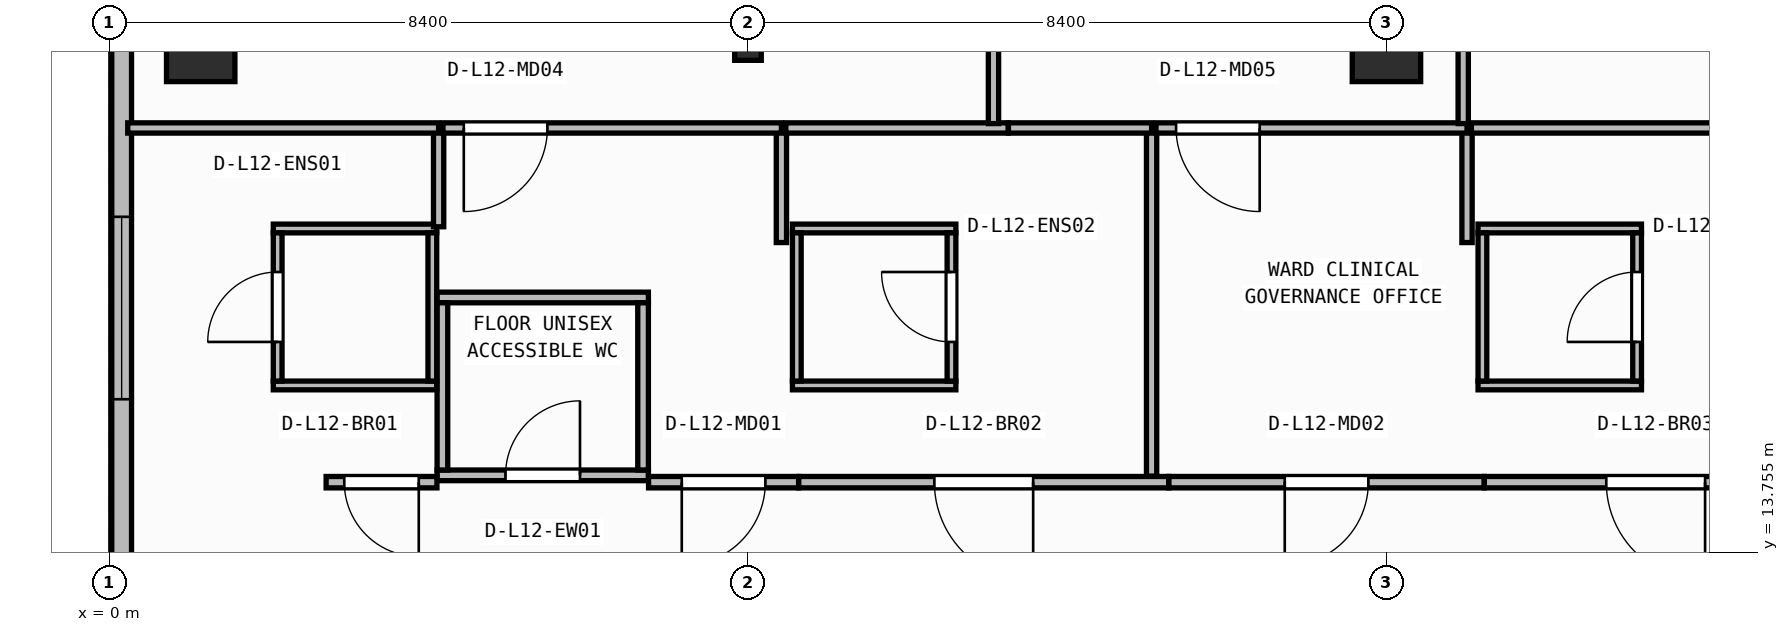
"""IFC4 building model, lengths in metres.
Left out: names, types, materials, properties, quantities, classifications, styles, units other than length and angle.
Written with IfcOpenShell. Run it as: python <this file> out.ifc"""

import sys

from ifc_helpers import new_model, si_unit, direction, frame, frame_2d, origin, origin_2d, place, context, subcontext, project, spatial, rectangle, i_section, extrude, element, fill, save


model = new_model("IFC4")
c1 = context("Model", 3, precision=1e-05, world=origin(), true_north=direction((0.0, 1.0)))
c2 = subcontext(c1, "Body", "Model", "MODEL_VIEW")
j1 = project(units=[si_unit("LENGTHUNIT", "METRE"), si_unit("PLANEANGLEUNIT", "RADIAN")], contexts=[c1])
p1 = place(None, origin())
s1 = spatial("IfcSite", under=j1, at=p1, CompositionType="ELEMENT")
p2 = place(p1, origin())
s2 = spatial("IfcBuilding", under=s1, at=p2, CompositionType="ELEMENT")
p3 = place(p2, frame((0.0, 0.0, 50.15)))
s3 = spatial("IfcBuildingStorey", under=s2, at=p3, CompositionType="ELEMENT", Elevation=50.15)
p4 = place(p3, frame((1.2, 20.4, 0.0), z_axis=(0.0, 0.0, 1.0), x_axis=(1.0, 0.0, 0.0)))
e1 = element("IfcColumn", 1, at=p4, inside=s3, PredefinedType="COLUMN", context=c2, shape_type="SweptSolid", body=[
    extrude(rectangle(XDim=0.9, YDim=0.9, at=origin_2d()), origin(), (0.0, 0.0, 1.0), 3.95),
])
p5 = place(p3, frame((8.4, 20.4, 0.0), z_axis=(0.0, 0.0, 1.0), x_axis=(1.0, 0.0, 0.0)))
e2 = element("IfcColumn", 2, at=p5, inside=s3, PredefinedType="COLUMN", context=c2, shape_type="SweptSolid", body=[
    extrude(i_section(OverallWidth=0.35, OverallDepth=0.34, WebThickness=0.016, FlangeThickness=0.028, at=origin_2d()), origin(), (0.0, 0.0, 1.0), 3.95),
])
p6 = place(p3, frame((16.8, 20.4, 0.0), z_axis=(0.0, 0.0, 1.0), x_axis=(1.0, 0.0, 0.0)))
e3 = element("IfcColumn", 3, at=p6, inside=s3, PredefinedType="COLUMN", context=c2, shape_type="SweptSolid", body=[
    extrude(rectangle(XDim=0.9, YDim=0.9, at=origin_2d()), origin(), (0.0, 0.0, 1.0), 3.95),
])
p7 = place(p3, frame((0.16, 41.04, 0.0), z_axis=(0.0, 0.0, 1.0), x_axis=(0.0, -1.0, 0.0)))
e4 = element("IfcWall", 4, at=p7, inside=s3, PredefinedType="STANDARD", context=c2, shape_type="SweptSolid", body=[
    extrude(rectangle(XDim=38.28, YDim=0.26, at=frame_2d((19.14, 0.0))), origin(), (0.0, 0.0, 1.0), 3.71),
])
p8 = place(p7, frame((17.94, 0.0, 0.9)))
e5 = element("IfcOpeningElement", 5, at=p8, cuts=e4, PredefinedType="OPENING", context=c2, shape_type="SweptSolid", body=[
    extrude(rectangle(XDim=2.4, YDim=1.65, at=frame_2d((1.2, 0.825))), frame((0.0, 0.14, 0.0), z_axis=(0.0, -1.0, 0.0), x_axis=(1.0, 0.0, 0.0)), (0.0, 0.0, 1.0), 0.28),
])
p9 = place(p7, frame((22.869, 0.0, 0.9)))
e6 = element("IfcOpeningElement", 6, at=p9, cuts=e4, PredefinedType="OPENING", context=c2, shape_type="SweptSolid", body=[
    extrude(rectangle(XDim=2.4, YDim=1.65, at=frame_2d((1.2, 0.825))), frame((0.0, 0.14, 0.0), z_axis=(0.0, -1.0, 0.0), x_axis=(1.0, 0.0, 0.0)), (0.0, 0.0, 1.0), 0.28),
])
p10 = place(p3, frame((4.31, 14.77, 0.0), z_axis=(0.0, 0.0, 1.0), x_axis=(1.0, 0.0, 0.0)))
e7 = element("IfcWall", 7, at=p10, inside=s3, PredefinedType="PARTITIONING", context=c2, shape_type="SweptSolid", body=[
    extrude(rectangle(XDim=2.78, YDim=0.14, at=frame_2d((1.39, 0.0))), origin(), (0.0, 0.0, 1.0), 3.71),
])
p11 = place(p10, frame((0.9, 0.0, 0.0)))
e8 = element("IfcOpeningElement", 8, at=p11, cuts=e7, PredefinedType="OPENING", context=c2, shape_type="SweptSolid", body=[
    extrude(rectangle(XDim=0.98, YDim=2.1, at=frame_2d((0.49, 1.05))), frame((0.0, 0.08, 0.0), z_axis=(0.0, -1.0, 0.0), x_axis=(1.0, 0.0, 0.0)), (0.0, 0.0, 1.0), 0.16),
])
p12 = place(p3, frame((4.31, 17.11, 0.0), z_axis=(0.0, 0.0, 1.0), x_axis=(1.0, 0.0, 0.0)))
e9 = element("IfcWall", 9, at=p12, inside=s3, PredefinedType="PARTITIONING", context=c2, shape_type="SweptSolid", body=[
    extrude(rectangle(XDim=2.78, YDim=0.14, at=frame_2d((1.39, 0.0))), origin(), (0.0, 0.0, 1.0), 3.71),
])
for number, where, z_axis, x_axis in (
    (10, (4.38, 14.84, 0.0), (0.0, 0.0, 1.0), (0.0, 1.0, 0.0)),
    (11, (7.02, 14.84, 0.0), (0.0, 0.0, 1.0), (0.0, 1.0, 0.0)),
):
    element("IfcWall", number, at=place(p3, frame(where, z_axis=z_axis, x_axis=x_axis)), inside=s3, PredefinedType="PARTITIONING", context=c2, shape_type="SweptSolid", body=[
        extrude(rectangle(XDim=2.2, YDim=0.14, at=frame_2d((1.1, 0.0))), origin(), (0.0, 0.0, 1.0), 3.71),
    ])
for number, where, z_axis, x_axis in (
    (12, (2.155, 15.952, 0.0), (0.0, 0.0, 1.0), (1.0, 0.0, 0.0)),
    (13, (2.155, 18.018, 0.0), (0.0, 0.0, 1.0), (1.0, 0.0, 0.0)),
):
    element("IfcWall", number, at=place(p3, frame(where, z_axis=z_axis, x_axis=x_axis)), inside=s3, PredefinedType="PARTITIONING", context=c2, shape_type="SweptSolid", body=[
        extrude(rectangle(XDim=2.15, YDim=0.115, at=frame_2d((1.075, 0.0))), origin(), (0.0, 0.0, 1.0), 3.71),
    ])
p13 = place(p3, frame((2.212, 16.01, 0.0), z_axis=(0.0, 0.0, 1.0), x_axis=(0.0, 1.0, 0.0)))
e14 = element("IfcWall", 14, at=p13, inside=s3, PredefinedType="PARTITIONING", context=c2, shape_type="SweptSolid", body=[
    extrude(rectangle(XDim=1.95, YDim=0.115, at=frame_2d((0.975, 0.0))), origin(), (0.0, 0.0, 1.0), 3.71),
])
p14 = place(p13, frame((0.515, 0.0, 0.0)))
e15 = element("IfcOpeningElement", 15, at=p14, cuts=e14, PredefinedType="OPENING", context=c2, shape_type="SweptSolid", body=[
    extrude(rectangle(XDim=0.92, YDim=2.1, at=frame_2d((0.46, 1.05))), frame((0.0, 0.067, 0.0), z_axis=(0.0, -1.0, 0.0), x_axis=(1.0, 0.0, 0.0)), (0.0, 0.0, 1.0), 0.135),
])
p15 = place(p3, frame((4.248, 16.01, 0.0), z_axis=(0.0, 0.0, 1.0), x_axis=(0.0, 1.0, 0.0)))
e16 = element("IfcWall", 16, at=p15, inside=s3, PredefinedType="PARTITIONING", context=c2, shape_type="SweptSolid", body=[
    extrude(rectangle(XDim=1.95, YDim=0.115, at=frame_2d((0.975, 0.0))), origin(), (0.0, 0.0, 1.0), 3.71),
])
for number, where, z_axis, x_axis in (
    (17, (8.985, 15.952, 0.0), (0.0, 0.0, 1.0), (1.0, 0.0, 0.0)),
    (18, (8.985, 18.018, 0.0), (0.0, 0.0, 1.0), (1.0, 0.0, 0.0)),
):
    element("IfcWall", number, at=place(p3, frame(where, z_axis=z_axis, x_axis=x_axis)), inside=s3, PredefinedType="PARTITIONING", context=c2, shape_type="SweptSolid", body=[
        extrude(rectangle(XDim=2.15, YDim=0.115, at=frame_2d((1.075, 0.0))), origin(), (0.0, 0.0, 1.0), 3.71),
    ])
p16 = place(p3, frame((9.042, 16.01, 0.0), z_axis=(0.0, 0.0, 1.0), x_axis=(0.0, 1.0, 0.0)))
e19 = element("IfcWall", 19, at=p16, inside=s3, PredefinedType="PARTITIONING", context=c2, shape_type="SweptSolid", body=[
    extrude(rectangle(XDim=1.95, YDim=0.115, at=frame_2d((0.975, 0.0))), origin(), (0.0, 0.0, 1.0), 3.71),
])
p17 = place(p3, frame((11.077, 16.01, 0.0), z_axis=(0.0, 0.0, 1.0), x_axis=(0.0, 1.0, 0.0)))
e20 = element("IfcWall", 20, at=p17, inside=s3, PredefinedType="PARTITIONING", context=c2, shape_type="SweptSolid", body=[
    extrude(rectangle(XDim=1.95, YDim=0.115, at=frame_2d((0.975, 0.0))), origin(), (0.0, 0.0, 1.0), 3.71),
])
p18 = place(p17, frame((0.515, 0.0, 0.0)))
e21 = element("IfcOpeningElement", 21, at=p18, cuts=e20, PredefinedType="OPENING", context=c2, shape_type="SweptSolid", body=[
    extrude(rectangle(XDim=0.92, YDim=2.1, at=frame_2d((0.46, 1.05))), frame((0.0, 0.067, 0.0), z_axis=(0.0, -1.0, 0.0), x_axis=(1.0, 0.0, 0.0)), (0.0, 0.0, 1.0), 0.135),
])
for number, where, z_axis, x_axis in (
    (22, (18.005, 15.952, 0.0), (0.0, 0.0, 1.0), (1.0, 0.0, 0.0)),
    (23, (18.005, 18.018, 0.0), (0.0, 0.0, 1.0), (1.0, 0.0, 0.0)),
):
    element("IfcWall", number, at=place(p3, frame(where, z_axis=z_axis, x_axis=x_axis)), inside=s3, PredefinedType="PARTITIONING", context=c2, shape_type="SweptSolid", body=[
        extrude(rectangle(XDim=2.15, YDim=0.115, at=frame_2d((1.075, 0.0))), origin(), (0.0, 0.0, 1.0), 3.71),
    ])
p19 = place(p3, frame((18.062, 16.01, 0.0), z_axis=(0.0, 0.0, 1.0), x_axis=(0.0, 1.0, 0.0)))
e24 = element("IfcWall", 24, at=p19, inside=s3, PredefinedType="PARTITIONING", context=c2, shape_type="SweptSolid", body=[
    extrude(rectangle(XDim=1.95, YDim=0.115, at=frame_2d((0.975, 0.0))), origin(), (0.0, 0.0, 1.0), 3.71),
])
p20 = place(p3, frame((20.097, 16.01, 0.0), z_axis=(0.0, 0.0, 1.0), x_axis=(0.0, 1.0, 0.0)))
e25 = element("IfcWall", 25, at=p20, inside=s3, PredefinedType="PARTITIONING", context=c2, shape_type="SweptSolid", body=[
    extrude(rectangle(XDim=1.95, YDim=0.115, at=frame_2d((0.975, 0.0))), origin(), (0.0, 0.0, 1.0), 3.71),
])
p21 = place(p20, frame((0.515, 0.0, 0.0)))
e26 = element("IfcOpeningElement", 26, at=p21, cuts=e25, PredefinedType="OPENING", context=c2, shape_type="SweptSolid", body=[
    extrude(rectangle(XDim=0.92, YDim=2.1, at=frame_2d((0.46, 1.05))), frame((0.0, 0.067, 0.0), z_axis=(0.0, -1.0, 0.0), x_axis=(1.0, 0.0, 0.0)), (0.0, 0.0, 1.0), 0.135),
])
p22 = place(p3, frame((4.308, 14.68, 0.0), z_axis=(0.0, 0.0, 1.0), x_axis=(-1.0, 0.0, 0.0)))
e27 = element("IfcWall", 27, at=p22, inside=s3, PredefinedType="PARTITIONING", context=c2, shape_type="SweptSolid", body=[
    extrude(rectangle(XDim=1.458, YDim=0.15, at=frame_2d((0.729, 0.0))), origin(), (0.0, 0.0, 1.0), 3.71),
])
p23 = place(p22, frame((0.239, 0.0, 0.0)))
e28 = element("IfcOpeningElement", 28, at=p23, cuts=e27, PredefinedType="OPENING", context=c2, shape_type="SweptSolid", body=[
    extrude(rectangle(XDim=0.98, YDim=2.1, at=frame_2d((0.49, 1.05))), frame((0.0, 0.085, 0.0), z_axis=(0.0, -1.0, 0.0), x_axis=(1.0, 0.0, 0.0)), (0.0, 0.0, 1.0), 0.17),
])
p24 = place(p3, frame((9.066, 14.68, 0.0), z_axis=(0.0, 0.0, 1.0), x_axis=(-1.0, 0.0, 0.0)))
e29 = element("IfcWall", 29, at=p24, inside=s3, PredefinedType="PARTITIONING", context=c2, shape_type="SweptSolid", body=[
    extrude(rectangle(XDim=1.974, YDim=0.15, at=frame_2d((0.987, 0.0))), origin(), (0.0, 0.0, 1.0), 3.71),
])
p25 = place(p24, frame((0.437, 0.0, 0.0)))
e30 = element("IfcOpeningElement", 30, at=p25, cuts=e29, PredefinedType="OPENING", context=c2, shape_type="SweptSolid", body=[
    extrude(rectangle(XDim=1.1, YDim=2.1, at=frame_2d((0.55, 1.05))), frame((0.0, 0.085, 0.0), z_axis=(0.0, -1.0, 0.0), x_axis=(1.0, 0.0, 0.0)), (0.0, 0.0, 1.0), 0.17),
])
p26 = place(p3, frame((13.936, 14.68, 0.0), z_axis=(0.0, 0.0, 1.0), x_axis=(-1.0, 0.0, 0.0)))
e31 = element("IfcWall", 31, at=p26, inside=s3, PredefinedType="PARTITIONING", context=c2, shape_type="SweptSolid", body=[
    extrude(rectangle(XDim=4.868, YDim=0.15, at=frame_2d((2.434, 0.0))), origin(), (0.0, 0.0, 1.0), 3.71),
])
p27 = place(p26, frame((1.784, 0.0, 0.0)))
e32 = element("IfcOpeningElement", 32, at=p27, cuts=e31, PredefinedType="OPENING", context=c2, shape_type="SweptSolid", body=[
    extrude(rectangle(XDim=1.3, YDim=2.15, at=frame_2d((0.65, 1.075))), frame((0.0, 0.085, 0.0), z_axis=(0.0, -1.0, 0.0), x_axis=(1.0, 0.0, 0.0)), (0.0, 0.0, 1.0), 0.17),
])
p28 = place(p3, frame((18.086, 14.68, 0.0), z_axis=(0.0, 0.0, 1.0), x_axis=(-1.0, 0.0, 0.0)))
e33 = element("IfcWall", 33, at=p28, inside=s3, PredefinedType="PARTITIONING", context=c2, shape_type="SweptSolid", body=[
    extrude(rectangle(XDim=4.148, YDim=0.15, at=frame_2d((2.074, 0.0))), origin(), (0.0, 0.0, 1.0), 3.71),
])
p29 = place(p28, frame((1.524, 0.0, 0.0)))
e34 = element("IfcOpeningElement", 34, at=p29, cuts=e33, PredefinedType="OPENING", context=c2, shape_type="SweptSolid", body=[
    extrude(rectangle(XDim=1.1, YDim=2.1, at=frame_2d((0.55, 1.05))), frame((0.0, 0.085, 0.0), z_axis=(0.0, -1.0, 0.0), x_axis=(1.0, 0.0, 0.0)), (0.0, 0.0, 1.0), 0.17),
])
p30 = place(p3, frame((22.596, 14.68, 0.0), z_axis=(0.0, 0.0, 1.0), x_axis=(-1.0, 0.0, 0.0)))
e35 = element("IfcWall", 35, at=p30, inside=s3, PredefinedType="PARTITIONING", context=c2, shape_type="SweptSolid", body=[
    extrude(rectangle(XDim=4.508, YDim=0.15, at=frame_2d((2.254, 0.0))), origin(), (0.0, 0.0, 1.0), 3.71),
])
p31 = place(p30, frame((1.604, 0.0, 0.0)))
e36 = element("IfcOpeningElement", 36, at=p31, cuts=e35, PredefinedType="OPENING", context=c2, shape_type="SweptSolid", body=[
    extrude(rectangle(XDim=1.3, YDim=2.15, at=frame_2d((0.65, 1.075))), frame((0.0, 0.085, 0.0), z_axis=(0.0, -1.0, 0.0), x_axis=(1.0, 0.0, 0.0)), (0.0, 0.0, 1.0), 0.17),
])
p32 = place(p3, frame((4.33, 18.04, 0.0), z_axis=(0.0, 0.0, 1.0), x_axis=(0.0, 1.0, 0.0)))
e37 = element("IfcWall", 37, at=p32, inside=s3, PredefinedType="PARTITIONING", context=c2, shape_type="SweptSolid", body=[
    extrude(rectangle(XDim=1.3, YDim=0.135, at=frame_2d((0.65, 0.0))), origin(), (0.0, 0.0, 1.0), 3.71),
])
p33 = place(p3, frame((4.33, 19.34, 0.0), z_axis=(0.0, 0.0, 1.0), x_axis=(-1.0, 0.0, 0.0)))
e38 = element("IfcWall", 38, at=p33, inside=s3, PredefinedType="PARTITIONING", context=c2, shape_type="SweptSolid", body=[
    extrude(rectangle(XDim=4.09, YDim=0.135, at=frame_2d((2.045, 0.0))), origin(), (0.0, 0.0, 1.0), 3.71),
])
p34 = place(p3, frame((8.84, 17.833, 0.0), z_axis=(0.0, 0.0, 1.0), x_axis=(0.0, 1.0, 0.0)))
e39 = element("IfcWall", 39, at=p34, inside=s3, PredefinedType="PARTITIONING", context=c2, shape_type="SweptSolid", body=[
    extrude(rectangle(XDim=1.508, YDim=0.135, at=frame_2d((0.754, 0.0))), origin(), (0.0, 0.0, 1.0), 3.71),
])
p35 = place(p3, frame((8.84, 19.34, 0.0), z_axis=(0.0, 0.0, 1.0), x_axis=(-1.0, 0.0, 0.0)))
e40 = element("IfcWall", 40, at=p35, inside=s3, PredefinedType="PARTITIONING", context=c2, shape_type="SweptSolid", body=[
    extrude(rectangle(XDim=4.453, YDim=0.135, at=frame_2d((2.226, 0.0))), origin(), (0.0, 0.0, 1.0), 3.71),
])
p36 = place(p35, frame((3.079, 0.0, 0.0)))
e41 = element("IfcOpeningElement", 41, at=p36, cuts=e40, PredefinedType="OPENING", context=c2, shape_type="SweptSolid", body=[
    extrude(rectangle(XDim=1.1, YDim=2.1, at=frame_2d((0.55, 1.05))), frame((0.0, 0.077, 0.0), z_axis=(0.0, -1.0, 0.0), x_axis=(1.0, 0.0, 0.0)), (0.0, 0.0, 1.0), 0.155),
])
p37 = place(p3, frame((13.71, 14.76, 0.0), z_axis=(0.0, 0.0, 1.0), x_axis=(0.0, 1.0, 0.0)))
e42 = element("IfcWall", 42, at=p37, inside=s3, PredefinedType="PARTITIONING", context=c2, shape_type="SweptSolid", body=[
    extrude(rectangle(XDim=4.58, YDim=0.135, at=frame_2d((2.29, 0.0))), origin(), (0.0, 0.0, 1.0), 3.71),
])
p38 = place(p3, frame((11.825, 19.34, 0.0), z_axis=(0.0, 0.0, 1.0), x_axis=(-1.0, 0.0, 0.0)))
e43 = element("IfcWall", 43, at=p38, inside=s3, PredefinedType="PARTITIONING", context=c2, shape_type="SweptSolid", body=[
    extrude(rectangle(XDim=2.927, YDim=0.135, at=frame_2d((1.464, 0.0))), origin(), (0.0, 0.0, 1.0), 3.71),
])
p39 = place(p3, frame((13.71, 19.34, 0.0), z_axis=(0.0, 0.0, 1.0), x_axis=(-1.0, 0.0, 0.0)))
e44 = element("IfcWall", 44, at=p39, inside=s3, PredefinedType="PARTITIONING", context=c2, shape_type="SweptSolid", body=[
    extrude(rectangle(XDim=1.883, YDim=0.135, at=frame_2d((0.942, 0.0))), origin(), (0.0, 0.0, 1.0), 3.71),
])
p40 = place(p3, frame((17.86, 17.833, 0.0), z_axis=(0.0, 0.0, 1.0), x_axis=(0.0, 1.0, 0.0)))
e45 = element("IfcWall", 45, at=p40, inside=s3, PredefinedType="PARTITIONING", context=c2, shape_type="SweptSolid", body=[
    extrude(rectangle(XDim=1.508, YDim=0.135, at=frame_2d((0.754, 0.0))), origin(), (0.0, 0.0, 1.0), 3.71),
])
p41 = place(p3, frame((17.86, 19.34, 0.0), z_axis=(0.0, 0.0, 1.0), x_axis=(-1.0, 0.0, 0.0)))
e46 = element("IfcWall", 46, at=p41, inside=s3, PredefinedType="PARTITIONING", context=c2, shape_type="SweptSolid", body=[
    extrude(rectangle(XDim=4.093, YDim=0.135, at=frame_2d((2.046, 0.0))), origin(), (0.0, 0.0, 1.0), 3.71),
])
p42 = place(p41, frame((2.728, 0.0, 0.0)))
e47 = element("IfcOpeningElement", 47, at=p42, cuts=e46, PredefinedType="OPENING", context=c2, shape_type="SweptSolid", body=[
    extrude(rectangle(XDim=1.1, YDim=2.1, at=frame_2d((0.55, 1.05))), frame((0.0, 0.077, 0.0), z_axis=(0.0, -1.0, 0.0), x_axis=(1.0, 0.0, 0.0)), (0.0, 0.0, 1.0), 0.155),
])
p43 = place(p3, frame((22.37, 19.34, 0.0), z_axis=(0.0, 0.0, 1.0), x_axis=(-1.0, 0.0, 0.0)))
e48 = element("IfcWall", 48, at=p43, inside=s3, PredefinedType="PARTITIONING", context=c2, shape_type="SweptSolid", body=[
    extrude(rectangle(XDim=4.453, YDim=0.135, at=frame_2d((2.226, 0.0))), origin(), (0.0, 0.0, 1.0), 3.71),
])
for number, where, z_axis, x_axis in (
    (49, (11.63, 19.397, 0.0), (0.0, 0.0, 1.0), (0.0, 1.0, 0.0)),
    (50, (17.81, 19.397, 0.0), (0.0, 0.0, 1.0), (0.0, 1.0, 0.0)),
):
    element("IfcWall", number, at=place(p3, frame(where, z_axis=z_axis, x_axis=x_axis)), inside=s3, PredefinedType="PARTITIONING", context=c2, shape_type="SweptSolid", body=[
        extrude(rectangle(XDim=9.522, YDim=0.135, at=frame_2d((4.761, 0.0))), origin(), (0.0, 0.0, 1.0), 3.71),
    ])
p44 = place(p11, origin())
e51 = element("IfcDoor", 51, at=p44, inside=s3, OperationType="SINGLE_SWING_RIGHT", PredefinedType="DOOR", context=c2, shape_type="SweptSolid", body=[
    extrude(rectangle(XDim=0.98, YDim=2.1, at=frame_2d((0.49, 1.05))), frame((0.0, 0.025, 0.0), z_axis=(0.0, -1.0, 0.0), x_axis=(1.0, 0.0, 0.0)), (0.0, 0.0, 1.0), 0.05),
])
fill(e8, e51)
p45 = place(p14, origin())
e52 = element("IfcDoor", 52, at=p45, inside=s3, OperationType="SINGLE_SWING_LEFT", PredefinedType="DOOR", context=c2, shape_type="SweptSolid", body=[
    extrude(rectangle(XDim=0.92, YDim=2.1, at=frame_2d((0.46, 1.05))), frame((0.0, 0.025, 0.0), z_axis=(0.0, -1.0, 0.0), x_axis=(1.0, 0.0, 0.0)), (0.0, 0.0, 1.0), 0.05),
])
fill(e15, e52)
p46 = place(p18, origin())
e53 = element("IfcDoor", 53, at=p46, inside=s3, OperationType="SINGLE_SWING_RIGHT", PredefinedType="DOOR", context=c2, shape_type="SweptSolid", body=[
    extrude(rectangle(XDim=0.92, YDim=2.1, at=frame_2d((0.46, 1.05))), frame((0.0, 0.025, 0.0), z_axis=(0.0, -1.0, 0.0), x_axis=(1.0, 0.0, 0.0)), (0.0, 0.0, 1.0), 0.05),
])
fill(e21, e53)
p47 = place(p21, origin())
e54 = element("IfcDoor", 54, at=p47, inside=s3, OperationType="SINGLE_SWING_LEFT", PredefinedType="DOOR", context=c2, shape_type="SweptSolid", body=[
    extrude(rectangle(XDim=0.92, YDim=2.1, at=frame_2d((0.46, 1.05))), frame((0.0, 0.025, 0.0), z_axis=(0.0, -1.0, 0.0), x_axis=(1.0, 0.0, 0.0)), (0.0, 0.0, 1.0), 0.05),
])
fill(e26, e54)
p48 = place(p23, origin())
e55 = element("IfcDoor", 55, at=p48, inside=s3, OperationType="SINGLE_SWING_LEFT", PredefinedType="DOOR", context=c2, shape_type="SweptSolid", body=[
    extrude(rectangle(XDim=0.98, YDim=2.1, at=frame_2d((0.49, 1.05))), frame((0.0, 0.025, 0.0), z_axis=(0.0, -1.0, 0.0), x_axis=(1.0, 0.0, 0.0)), (0.0, 0.0, 1.0), 0.05),
])
fill(e28, e55)
p49 = place(p25, origin())
e56 = element("IfcDoor", 56, at=p49, inside=s3, OperationType="SINGLE_SWING_RIGHT", PredefinedType="DOOR", context=c2, shape_type="SweptSolid", body=[
    extrude(rectangle(XDim=1.1, YDim=2.1, at=frame_2d((0.55, 1.05))), frame((0.0, 0.025, 0.0), z_axis=(0.0, -1.0, 0.0), x_axis=(1.0, 0.0, 0.0)), (0.0, 0.0, 1.0), 0.05),
])
fill(e30, e56)
p50 = place(p27, origin())
e57 = element("IfcDoor", 57, at=p50, inside=s3, OperationType="SINGLE_SWING_LEFT", PredefinedType="DOOR", context=c2, shape_type="SweptSolid", body=[
    extrude(rectangle(XDim=1.3, YDim=2.15, at=frame_2d((0.65, 1.075))), frame((0.0, 0.025, 0.0), z_axis=(0.0, -1.0, 0.0), x_axis=(1.0, 0.0, 0.0)), (0.0, 0.0, 1.0), 0.05),
])
fill(e32, e57)
p51 = place(p29, origin())
e58 = element("IfcDoor", 58, at=p51, inside=s3, OperationType="SINGLE_SWING_RIGHT", PredefinedType="DOOR", context=c2, shape_type="SweptSolid", body=[
    extrude(rectangle(XDim=1.1, YDim=2.1, at=frame_2d((0.55, 1.05))), frame((0.0, 0.025, 0.0), z_axis=(0.0, -1.0, 0.0), x_axis=(1.0, 0.0, 0.0)), (0.0, 0.0, 1.0), 0.05),
])
fill(e34, e58)
p52 = place(p31, origin())
e59 = element("IfcDoor", 59, at=p52, inside=s3, OperationType="SINGLE_SWING_LEFT", PredefinedType="DOOR", context=c2, shape_type="SweptSolid", body=[
    extrude(rectangle(XDim=1.3, YDim=2.15, at=frame_2d((0.65, 1.075))), frame((0.0, 0.025, 0.0), z_axis=(0.0, -1.0, 0.0), x_axis=(1.0, 0.0, 0.0)), (0.0, 0.0, 1.0), 0.05),
])
fill(e36, e59)
p53 = place(p36, origin())
e60 = element("IfcDoor", 60, at=p53, inside=s3, OperationType="SINGLE_SWING_RIGHT", PredefinedType="DOOR", context=c2, shape_type="SweptSolid", body=[
    extrude(rectangle(XDim=1.1, YDim=2.1, at=frame_2d((0.55, 1.05))), frame((0.0, 0.025, 0.0), z_axis=(0.0, -1.0, 0.0), x_axis=(1.0, 0.0, 0.0)), (0.0, 0.0, 1.0), 0.05),
])
fill(e41, e60)
p54 = place(p42, origin())
e61 = element("IfcDoor", 61, at=p54, inside=s3, OperationType="SINGLE_SWING_LEFT", PredefinedType="DOOR", context=c2, shape_type="SweptSolid", body=[
    extrude(rectangle(XDim=1.1, YDim=2.1, at=frame_2d((0.55, 1.05))), frame((0.0, 0.025, 0.0), z_axis=(0.0, -1.0, 0.0), x_axis=(1.0, 0.0, 0.0)), (0.0, 0.0, 1.0), 0.05),
])
fill(e47, e61)
p55 = place(p9, origin())
e62 = element("IfcWindow", 62, at=p55, inside=s3, PartitioningType="SINGLE_PANEL", PredefinedType="WINDOW", context=c2, shape_type="SweptSolid", body=[
    extrude(rectangle(XDim=2.4, YDim=1.65, at=frame_2d((1.2, 0.825))), frame((0.0, 0.03, 0.0), z_axis=(0.0, -1.0, 0.0), x_axis=(1.0, 0.0, 0.0)), (0.0, 0.0, 1.0), 0.06),
])
fill(e6, e62)
save(model, sys.argv[1])
